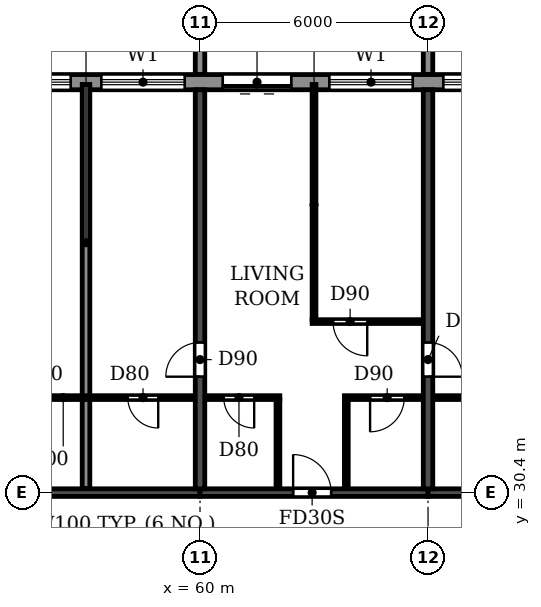
"""IFC4 building model, lengths in metres.
Left out: names, types, materials, properties, quantities, classifications, styles, units other than length and angle.
Written with IfcOpenShell. Run it as: python <this file> out.ifc"""

import sys

from ifc_helpers import new_model, si_unit, direction, frame, frame_2d, origin, place, context, subcontext, project, spatial, polyline, rectangle, outline, extrude, source, transform, mapped, element, fill, save


model = new_model("IFC4")
c1 = context("Model", 3, precision=1e-05, world=origin(), true_north=direction((0.0, 1.0)))
c2 = subcontext(c1, "Body", "Model", "MODEL_VIEW")
j1 = project(units=[si_unit("LENGTHUNIT", "METRE"), si_unit("PLANEANGLEUNIT", "RADIAN")], contexts=[c1])
p1 = place(None, origin())
s1 = spatial("IfcSite", under=j1, at=p1, CompositionType="ELEMENT")
p2 = place(p1, origin())
s2 = spatial("IfcBuilding", under=s1, at=p2, CompositionType="ELEMENT")
p3 = place(p2, frame((0.0, 0.0, 201.6)))
s3 = spatial("IfcBuildingStorey", under=s2, at=p3, CompositionType="ELEMENT", Elevation=201.6)
p4 = place(p3, frame((60.0, 30.5, 0.0), z_axis=(0.0, 0.0, 1.0), x_axis=(0.0, 1.0, 0.0)))
e1 = element("IfcWall", 1, at=p4, inside=s3, PredefinedType="SHEAR", context=c2, shape_type="SweptSolid", body=[
    extrude(rectangle(XDim=10.5, YDim=0.25, at=frame_2d((5.25, 0.0))), origin(), (0.0, 0.0, 1.0), 3.08),
])
p5 = place(p4, frame((2.95, 0.0, 0.0)))
e2 = element("IfcOpeningElement", 2, at=p5, cuts=e1, PredefinedType="OPENING", context=c2, shape_type="SweptSolid", body=[
    extrude(rectangle(XDim=0.9, YDim=2.1, at=frame_2d((0.45, 1.05))), frame((0.0, 0.135, 0.0), z_axis=(0.0, -1.0, 0.0), x_axis=(1.0, 0.0, 0.0)), (0.0, 0.0, 1.0), 0.27),
])
p6 = place(p3, frame((66.0, 30.5, 0.0), z_axis=(0.0, 0.0, 1.0), x_axis=(0.0, 1.0, 0.0)))
e3 = element("IfcWall", 3, at=p6, inside=s3, PredefinedType="SHEAR", context=c2, shape_type="SweptSolid", body=[
    extrude(rectangle(XDim=10.5, YDim=0.25, at=frame_2d((5.25, 0.0))), origin(), (0.0, 0.0, 1.0), 3.08),
])
p7 = place(p6, frame((2.95, 0.0, 0.0)))
e4 = element("IfcOpeningElement", 4, at=p7, cuts=e3, PredefinedType="OPENING", context=c2, shape_type="SweptSolid", body=[
    extrude(rectangle(XDim=0.9, YDim=2.1, at=frame_2d((0.45, 1.05))), frame((0.0, 0.135, 0.0), z_axis=(0.0, -1.0, 0.0), x_axis=(1.0, 0.0, 0.0)), (0.0, 0.0, 1.0), 0.27),
])
p8 = place(p3, frame((54.0, 30.4, 0.0), z_axis=(0.0, 0.0, 1.0), x_axis=(1.0, 0.0, 0.0)))
e5 = element("IfcWall", 5, at=p8, inside=s3, PredefinedType="SHEAR", context=c2, shape_type="SweptSolid", body=[
    extrude(rectangle(XDim=6.0, YDim=0.2, at=frame_2d((3.0, 0.0))), origin(), (0.0, 0.0, 1.0), 2.48),
])
p9 = place(p3, frame((60.0, 30.4, 0.0), z_axis=(0.0, 0.0, 1.0), x_axis=(1.0, 0.0, 0.0)))
e6 = element("IfcWall", 6, at=p9, inside=s3, PredefinedType="SHEAR", context=c2, shape_type="SweptSolid", body=[
    extrude(rectangle(XDim=6.0, YDim=0.2, at=frame_2d((3.0, 0.0))), origin(), (0.0, 0.0, 1.0), 2.48),
])
p10 = place(p9, frame((2.45, 0.0, 0.0)))
e7 = element("IfcOpeningElement", 7, at=p10, cuts=e6, PredefinedType="OPENING", context=c2, shape_type="SweptSolid", body=[
    extrude(rectangle(XDim=1.0, YDim=2.1, at=frame_2d((0.5, 1.05))), frame((0.0, 0.11, 0.0), z_axis=(0.0, -1.0, 0.0), x_axis=(1.0, 0.0, 0.0)), (0.0, 0.0, 1.0), 0.22),
])
p11 = place(p3, frame((66.0, 30.4, 0.0), z_axis=(0.0, 0.0, 1.0), x_axis=(1.0, 0.0, 0.0)))
e8 = element("IfcWall", 8, at=p11, inside=s3, PredefinedType="SHEAR", context=c2, shape_type="SweptSolid", body=[
    extrude(rectangle(XDim=6.0, YDim=0.2, at=frame_2d((3.0, 0.0))), origin(), (0.0, 0.0, 1.0), 2.48),
])
p12 = place(p3, frame((79.317, 41.2, 0.0), z_axis=(0.0, 0.0, 1.0), x_axis=(-1.0, 0.0, 0.0)))
e9 = element("IfcWall", 9, at=p12, inside=s3, PredefinedType="STANDARD", context=c2, shape_type="SweptSolid", body=[
    extrude(rectangle(XDim=56.634, YDim=0.4, at=frame_2d((28.317, 0.0))), origin(), (0.0, 0.0, 1.0), 3.08),
])
p13 = place(p12, frame((52.717, 0.0, 0.9)))
e10 = element("IfcOpeningElement", 10, at=p13, cuts=e9, PredefinedType="OPENING", context=c2, shape_type="SweptSolid", body=[
    extrude(rectangle(XDim=2.2, YDim=1.5, at=frame_2d((1.1, 0.75))), frame((0.0, 0.21, 0.0), z_axis=(0.0, -1.0, 0.0), x_axis=(1.0, 0.0, 0.0)), (0.0, 0.0, 1.0), 0.42),
])
p14 = place(p12, frame((49.917, 0.0, 0.0)))
e11 = element("IfcOpeningElement", 11, at=p14, cuts=e9, PredefinedType="OPENING", context=c2, shape_type="SweptSolid", body=[
    extrude(rectangle(XDim=1.8, YDim=2.4, at=frame_2d((0.9, 1.2))), frame((0.0, 0.21, 0.0), z_axis=(0.0, -1.0, 0.0), x_axis=(1.0, 0.0, 0.0)), (0.0, 0.0, 1.0), 0.42),
])
p15 = place(p12, frame((46.717, 0.0, 0.9)))
e12 = element("IfcOpeningElement", 12, at=p15, cuts=e9, PredefinedType="OPENING", context=c2, shape_type="SweptSolid", body=[
    extrude(rectangle(XDim=2.2, YDim=1.5, at=frame_2d((1.1, 0.75))), frame((0.0, 0.21, 0.0), z_axis=(0.0, -1.0, 0.0), x_axis=(1.0, 0.0, 0.0)), (0.0, 0.0, 1.0), 0.42),
])
p16 = place(p12, frame((43.917, 0.0, 0.0)))
e13 = element("IfcOpeningElement", 13, at=p16, cuts=e9, PredefinedType="OPENING", context=c2, shape_type="SweptSolid", body=[
    extrude(rectangle(XDim=1.8, YDim=2.4, at=frame_2d((0.9, 1.2))), frame((0.0, 0.21, 0.0), z_axis=(0.0, -1.0, 0.0), x_axis=(1.0, 0.0, 0.0)), (0.0, 0.0, 1.0), 0.42),
])
p17 = place(p12, frame((40.917, 0.0, 0.0)))
e14 = element("IfcOpeningElement", 14, at=p17, cuts=e9, PredefinedType="OPENING", context=c2, shape_type="SweptSolid", body=[
    extrude(rectangle(XDim=1.8, YDim=2.4, at=frame_2d((0.9, 1.2))), frame((0.0, 0.21, 0.0), z_axis=(0.0, -1.0, 0.0), x_axis=(1.0, 0.0, 0.0)), (0.0, 0.0, 1.0), 0.42),
])
p18 = place(p12, frame((37.717, 0.0, 0.9)))
e15 = element("IfcOpeningElement", 15, at=p18, cuts=e9, PredefinedType="OPENING", context=c2, shape_type="SweptSolid", body=[
    extrude(rectangle(XDim=2.2, YDim=1.5, at=frame_2d((1.1, 0.75))), frame((0.0, 0.21, 0.0), z_axis=(0.0, -1.0, 0.0), x_axis=(1.0, 0.0, 0.0)), (0.0, 0.0, 1.0), 0.42),
])
p19 = place(p12, frame((34.717, 0.0, 0.9)))
e16 = element("IfcOpeningElement", 16, at=p19, cuts=e9, PredefinedType="OPENING", context=c2, shape_type="SweptSolid", body=[
    extrude(rectangle(XDim=2.2, YDim=1.5, at=frame_2d((1.1, 0.75))), frame((0.0, 0.21, 0.0), z_axis=(0.0, -1.0, 0.0), x_axis=(1.0, 0.0, 0.0)), (0.0, 0.0, 1.0), 0.42),
])
p20 = place(p12, frame((31.717, 0.0, 0.9)))
e17 = element("IfcOpeningElement", 17, at=p20, cuts=e9, PredefinedType="OPENING", context=c2, shape_type="SweptSolid", body=[
    extrude(rectangle(XDim=2.2, YDim=1.5, at=frame_2d((1.1, 0.75))), frame((0.0, 0.21, 0.0), z_axis=(0.0, -1.0, 0.0), x_axis=(1.0, 0.0, 0.0)), (0.0, 0.0, 1.0), 0.42),
])
p21 = place(p12, frame((28.717, 0.0, 0.9)))
e18 = element("IfcOpeningElement", 18, at=p21, cuts=e9, PredefinedType="OPENING", context=c2, shape_type="SweptSolid", body=[
    extrude(rectangle(XDim=2.2, YDim=1.5, at=frame_2d((1.1, 0.75))), frame((0.0, 0.21, 0.0), z_axis=(0.0, -1.0, 0.0), x_axis=(1.0, 0.0, 0.0)), (0.0, 0.0, 1.0), 0.42),
])
p22 = place(p12, frame((25.917, 0.0, 0.0)))
e19 = element("IfcOpeningElement", 19, at=p22, cuts=e9, PredefinedType="OPENING", context=c2, shape_type="SweptSolid", body=[
    extrude(rectangle(XDim=1.8, YDim=2.4, at=frame_2d((0.9, 1.2))), frame((0.0, 0.21, 0.0), z_axis=(0.0, -1.0, 0.0), x_axis=(1.0, 0.0, 0.0)), (0.0, 0.0, 1.0), 0.42),
])
p23 = place(p12, frame((22.717, 0.0, 0.9)))
e20 = element("IfcOpeningElement", 20, at=p23, cuts=e9, PredefinedType="OPENING", context=c2, shape_type="SweptSolid", body=[
    extrude(rectangle(XDim=2.2, YDim=1.5, at=frame_2d((1.1, 0.75))), frame((0.0, 0.21, 0.0), z_axis=(0.0, -1.0, 0.0), x_axis=(1.0, 0.0, 0.0)), (0.0, 0.0, 1.0), 0.42),
])
p24 = place(p12, frame((19.717, 0.0, 0.9)))
e21 = element("IfcOpeningElement", 21, at=p24, cuts=e9, PredefinedType="OPENING", context=c2, shape_type="SweptSolid", body=[
    extrude(rectangle(XDim=2.2, YDim=1.5, at=frame_2d((1.1, 0.75))), frame((0.0, 0.21, 0.0), z_axis=(0.0, -1.0, 0.0), x_axis=(1.0, 0.0, 0.0)), (0.0, 0.0, 1.0), 0.42),
])
p25 = place(p12, frame((16.917, 0.0, 0.0)))
e22 = element("IfcOpeningElement", 22, at=p25, cuts=e9, PredefinedType="OPENING", context=c2, shape_type="SweptSolid", body=[
    extrude(rectangle(XDim=1.8, YDim=2.4, at=frame_2d((0.9, 1.2))), frame((0.0, 0.21, 0.0), z_axis=(0.0, -1.0, 0.0), x_axis=(1.0, 0.0, 0.0)), (0.0, 0.0, 1.0), 0.42),
])
p26 = place(p12, frame((13.717, 0.0, 0.9)))
e23 = element("IfcOpeningElement", 23, at=p26, cuts=e9, PredefinedType="OPENING", context=c2, shape_type="SweptSolid", body=[
    extrude(rectangle(XDim=2.2, YDim=1.5, at=frame_2d((1.1, 0.75))), frame((0.0, 0.21, 0.0), z_axis=(0.0, -1.0, 0.0), x_axis=(1.0, 0.0, 0.0)), (0.0, 0.0, 1.0), 0.42),
])
p27 = place(p12, frame((10.717, 0.0, 0.9)))
e24 = element("IfcOpeningElement", 24, at=p27, cuts=e9, PredefinedType="OPENING", context=c2, shape_type="SweptSolid", body=[
    extrude(rectangle(XDim=2.2, YDim=1.5, at=frame_2d((1.1, 0.75))), frame((0.0, 0.21, 0.0), z_axis=(0.0, -1.0, 0.0), x_axis=(1.0, 0.0, 0.0)), (0.0, 0.0, 1.0), 0.42),
])
p28 = place(p12, frame((7.717, 0.0, 0.9)))
e25 = element("IfcOpeningElement", 25, at=p28, cuts=e9, PredefinedType="OPENING", context=c2, shape_type="SweptSolid", body=[
    extrude(rectangle(XDim=2.2, YDim=1.5, at=frame_2d((1.1, 0.75))), frame((0.0, 0.21, 0.0), z_axis=(0.0, -1.0, 0.0), x_axis=(1.0, 0.0, 0.0)), (0.0, 0.0, 1.0), 0.42),
])
p29 = place(p12, frame((4.917, 0.0, 0.0)))
e26 = element("IfcOpeningElement", 26, at=p29, cuts=e9, PredefinedType="OPENING", context=c2, shape_type="SweptSolid", body=[
    extrude(rectangle(XDim=1.8, YDim=2.4, at=frame_2d((0.9, 1.2))), frame((0.0, 0.21, 0.0), z_axis=(0.0, -1.0, 0.0), x_axis=(1.0, 0.0, 0.0)), (0.0, 0.0, 1.0), 0.42),
])
p30 = place(p12, frame((1.717, 0.0, 0.9)))
e27 = element("IfcOpeningElement", 27, at=p30, cuts=e9, PredefinedType="OPENING", context=c2, shape_type="SweptSolid", body=[
    extrude(rectangle(XDim=2.2, YDim=1.5, at=frame_2d((1.1, 0.75))), frame((0.0, 0.21, 0.0), z_axis=(0.0, -1.0, 0.0), x_axis=(1.0, 0.0, 0.0)), (0.0, 0.0, 1.0), 0.42),
])
m1 = source(origin(), c2, "Body", "SweptSolid", [
    extrude(outline(polyline([(0.0, 0.0), (0.25, 0.0), (0.25, 3.1), (0.0, 3.1), (0.0, 0.0)])), origin(), (0.0, 0.0, 1.0), 3.1),
])
for number, where in (
    (28, (59.875, 41.4, 0.0)),
    (29, (65.875, 41.4, 0.0)),
):
    element("IfcWall", number, at=place(p3, frame(where)), inside=s3, PredefinedType="STANDARD", context=c2, shape_type="MappedRepresentation", body=[
        mapped(m1, transform((0.0, 0.0, 0.0))),
    ])
p31 = place(p3, frame((57.0, 30.51, 0.0), z_axis=(0.0, 0.0, 1.0), x_axis=(0.0, 1.0, 0.0)))
e30 = element("IfcWall", 30, at=p31, inside=s3, PredefinedType="PARTITIONING", context=c2, shape_type="SweptSolid", body=[
    extrude(rectangle(XDim=10.63, YDim=0.2, at=frame_2d((5.315, 0.0))), origin(), (0.0, 0.0, 1.0), 3.08),
])
p32 = place(p3, frame((54.135, 32.9, 0.0), z_axis=(0.0, 0.0, 1.0), x_axis=(1.0, 0.0, 0.0)))
e31 = element("IfcWall", 31, at=p32, inside=s3, PredefinedType="PARTITIONING", context=c2, shape_type="SweptSolid", body=[
    extrude(rectangle(XDim=5.73, YDim=0.1, at=frame_2d((2.865, 0.0))), origin(), (0.0, 0.0, 1.0), 3.08),
])
p33 = place(p32, frame((0.965, 0.0, 0.0)))
e32 = element("IfcOpeningElement", 32, at=p33, cuts=e31, PredefinedType="OPENING", context=c2, shape_type="SweptSolid", body=[
    extrude(rectangle(XDim=0.8, YDim=2.1, at=frame_2d((0.4, 1.05))), frame((0.0, 0.06, 0.0), z_axis=(0.0, -1.0, 0.0), x_axis=(1.0, 0.0, 0.0)), (0.0, 0.0, 1.0), 0.12),
])
p34 = place(p32, frame((3.965, 0.0, 0.0)))
e33 = element("IfcOpeningElement", 33, at=p34, cuts=e31, PredefinedType="OPENING", context=c2, shape_type="SweptSolid", body=[
    extrude(rectangle(XDim=0.8, YDim=2.1, at=frame_2d((0.4, 1.05))), frame((0.0, 0.06, 0.0), z_axis=(0.0, -1.0, 0.0), x_axis=(1.0, 0.0, 0.0)), (0.0, 0.0, 1.0), 0.12),
])
p35 = place(p3, frame((60.135, 32.9, 0.0), z_axis=(0.0, 0.0, 1.0), x_axis=(1.0, 0.0, 0.0)))
e34 = element("IfcWall", 34, at=p35, inside=s3, PredefinedType="PARTITIONING", context=c2, shape_type="SweptSolid", body=[
    extrude(rectangle(XDim=1.965, YDim=0.1, at=frame_2d((0.982, 0.0))), origin(), (0.0, 0.0, 1.0), 3.08),
])
p36 = place(p35, frame((0.49, 0.0, 0.0)))
e35 = element("IfcOpeningElement", 35, at=p36, cuts=e34, PredefinedType="OPENING", context=c2, shape_type="SweptSolid", body=[
    extrude(rectangle(XDim=0.8, YDim=2.1, at=frame_2d((0.4, 1.05))), frame((0.0, 0.06, 0.0), z_axis=(0.0, -1.0, 0.0), x_axis=(1.0, 0.0, 0.0)), (0.0, 0.0, 1.0), 0.12),
])
p37 = place(p3, frame((63.8, 32.9, 0.0), z_axis=(0.0, 0.0, 1.0), x_axis=(1.0, 0.0, 0.0)))
e36 = element("IfcWall", 36, at=p37, inside=s3, PredefinedType="PARTITIONING", context=c2, shape_type="SweptSolid", body=[
    extrude(rectangle(XDim=2.065, YDim=0.1, at=frame_2d((1.032, 0.0))), origin(), (0.0, 0.0, 1.0), 3.08),
])
p38 = place(p37, frame((0.675, 0.0, 0.0)))
e37 = element("IfcOpeningElement", 37, at=p38, cuts=e36, PredefinedType="OPENING", context=c2, shape_type="SweptSolid", body=[
    extrude(rectangle(XDim=0.9, YDim=2.1, at=frame_2d((0.45, 1.05))), frame((0.0, 0.06, 0.0), z_axis=(0.0, -1.0, 0.0), x_axis=(1.0, 0.0, 0.0)), (0.0, 0.0, 1.0), 0.12),
])
p39 = place(p3, frame((66.135, 32.9, 0.0), z_axis=(0.0, 0.0, 1.0), x_axis=(1.0, 0.0, 0.0)))
e38 = element("IfcWall", 38, at=p39, inside=s3, PredefinedType="PARTITIONING", context=c2, shape_type="SweptSolid", body=[
    extrude(rectangle(XDim=2.765, YDim=0.1, at=frame_2d((1.382, 0.0))), origin(), (0.0, 0.0, 1.0), 3.08),
])
p40 = place(p39, frame((0.965, 0.0, 0.0)))
e39 = element("IfcOpeningElement", 39, at=p40, cuts=e38, PredefinedType="OPENING", context=c2, shape_type="SweptSolid", body=[
    extrude(rectangle(XDim=0.8, YDim=2.1, at=frame_2d((0.4, 1.05))), frame((0.0, 0.06, 0.0), z_axis=(0.0, -1.0, 0.0), x_axis=(1.0, 0.0, 0.0)), (0.0, 0.0, 1.0), 0.12),
])
p41 = place(p3, frame((62.95, 34.9, 0.0), z_axis=(0.0, 0.0, 1.0), x_axis=(1.0, 0.0, 0.0)))
e40 = element("IfcWall", 40, at=p41, inside=s3, PredefinedType="PARTITIONING", context=c2, shape_type="SweptSolid", body=[
    extrude(rectangle(XDim=2.915, YDim=0.1, at=frame_2d((1.458, 0.0))), origin(), (0.0, 0.0, 1.0), 3.08),
])
p42 = place(p41, frame((0.55, 0.0, 0.0)))
e41 = element("IfcOpeningElement", 41, at=p42, cuts=e40, PredefinedType="OPENING", context=c2, shape_type="SweptSolid", body=[
    extrude(rectangle(XDim=0.9, YDim=2.1, at=frame_2d((0.45, 1.05))), frame((0.0, 0.06, 0.0), z_axis=(0.0, -1.0, 0.0), x_axis=(1.0, 0.0, 0.0)), (0.0, 0.0, 1.0), 0.12),
])
p43 = place(p3, frame((62.05, 30.51, 0.0), z_axis=(0.0, 0.0, 1.0), x_axis=(0.0, 1.0, 0.0)))
e42 = element("IfcWall", 42, at=p43, inside=s3, PredefinedType="PARTITIONING", context=c2, shape_type="SweptSolid", body=[
    extrude(rectangle(XDim=2.34, YDim=0.1, at=frame_2d((1.17, 0.0))), origin(), (0.0, 0.0, 1.0), 3.08),
])
p44 = place(p3, frame((63.0, 34.95, 0.0), z_axis=(0.0, 0.0, 1.0), x_axis=(0.0, 1.0, 0.0)))
e43 = element("IfcWall", 43, at=p44, inside=s3, PredefinedType="PARTITIONING", context=c2, shape_type="SweptSolid", body=[
    extrude(rectangle(XDim=6.19, YDim=0.1, at=frame_2d((3.095, 0.0))), origin(), (0.0, 0.0, 1.0), 3.08),
])
p45 = place(p3, frame((63.85, 30.51, 0.0), z_axis=(0.0, 0.0, 1.0), x_axis=(0.0, 1.0, 0.0)))
e44 = element("IfcWall", 44, at=p45, inside=s3, PredefinedType="PARTITIONING", context=c2, shape_type="SweptSolid", body=[
    extrude(rectangle(XDim=2.34, YDim=0.1, at=frame_2d((1.17, 0.0))), origin(), (0.0, 0.0, 1.0), 3.08),
])
p46 = place(p23, origin())
e45 = element("IfcWindow", 45, at=p46, inside=s3, PartitioningType="DOUBLE_PANEL_HORIZONTAL", PredefinedType="WINDOW", context=c2, shape_type="SweptSolid", body=[
    extrude(rectangle(XDim=2.2, YDim=1.5, at=frame_2d((1.1, 0.75))), frame((0.0, 0.03, 0.0), z_axis=(0.0, -1.0, 0.0), x_axis=(1.0, 0.0, 0.0)), (0.0, 0.0, 1.0), 0.06),
])
fill(e20, e45)
p47 = place(p24, origin())
e46 = element("IfcWindow", 46, at=p47, inside=s3, PartitioningType="DOUBLE_PANEL_HORIZONTAL", PredefinedType="WINDOW", context=c2, shape_type="SweptSolid", body=[
    extrude(rectangle(XDim=2.2, YDim=1.5, at=frame_2d((1.1, 0.75))), frame((0.0, 0.03, 0.0), z_axis=(0.0, -1.0, 0.0), x_axis=(1.0, 0.0, 0.0)), (0.0, 0.0, 1.0), 0.06),
])
fill(e21, e46)
p48 = place(p25, origin())
e47 = element("IfcDoor", 47, at=p48, inside=s3, OperationType="DOUBLE_DOOR_SLIDING", PredefinedType="DOOR", context=c2, shape_type="SweptSolid", body=[
    extrude(rectangle(XDim=1.8, YDim=2.4, at=frame_2d((0.9, 1.2))), frame((0.0, 0.025, 0.0), z_axis=(0.0, -1.0, 0.0), x_axis=(1.0, 0.0, 0.0)), (0.0, 0.0, 1.0), 0.05),
])
fill(e22, e47)
p49 = place(p26, origin())
e48 = element("IfcWindow", 48, at=p49, inside=s3, PartitioningType="DOUBLE_PANEL_HORIZONTAL", PredefinedType="WINDOW", context=c2, shape_type="SweptSolid", body=[
    extrude(rectangle(XDim=2.2, YDim=1.5, at=frame_2d((1.1, 0.75))), frame((0.0, 0.03, 0.0), z_axis=(0.0, -1.0, 0.0), x_axis=(1.0, 0.0, 0.0)), (0.0, 0.0, 1.0), 0.06),
])
fill(e23, e48)
p50 = place(p27, origin())
e49 = element("IfcWindow", 49, at=p50, inside=s3, PartitioningType="DOUBLE_PANEL_HORIZONTAL", PredefinedType="WINDOW", context=c2, shape_type="SweptSolid", body=[
    extrude(rectangle(XDim=2.2, YDim=1.5, at=frame_2d((1.1, 0.75))), frame((0.0, 0.03, 0.0), z_axis=(0.0, -1.0, 0.0), x_axis=(1.0, 0.0, 0.0)), (0.0, 0.0, 1.0), 0.06),
])
fill(e24, e49)
p51 = place(p34, frame((0.8, 0.0, 0.0), z_axis=(0.0, 0.0, 1.0), x_axis=(-1.0, 0.0, 0.0)))
e50 = element("IfcDoor", 50, at=p51, inside=s3, OperationType="SINGLE_SWING_LEFT", PredefinedType="DOOR", context=c2, shape_type="SweptSolid", body=[
    extrude(rectangle(XDim=0.8, YDim=2.1, at=frame_2d((0.4, 1.05))), frame((0.0, 0.025, 0.0), z_axis=(0.0, -1.0, 0.0), x_axis=(1.0, 0.0, 0.0)), (0.0, 0.0, 1.0), 0.05),
])
fill(e33, e50)
p52 = place(p5, origin())
e51 = element("IfcDoor", 51, at=p52, inside=s3, OperationType="SINGLE_SWING_LEFT", PredefinedType="DOOR", context=c2, shape_type="SweptSolid", body=[
    extrude(rectangle(XDim=0.9, YDim=2.1, at=frame_2d((0.45, 1.05))), frame((0.0, 0.025, 0.0), z_axis=(0.0, -1.0, 0.0), x_axis=(1.0, 0.0, 0.0)), (0.0, 0.0, 1.0), 0.05),
])
fill(e2, e51)
p53 = place(p36, frame((0.8, 0.0, 0.0), z_axis=(0.0, 0.0, 1.0), x_axis=(-1.0, 0.0, 0.0)))
e52 = element("IfcDoor", 52, at=p53, inside=s3, OperationType="SINGLE_SWING_LEFT", PredefinedType="DOOR", context=c2, shape_type="SweptSolid", body=[
    extrude(rectangle(XDim=0.8, YDim=2.1, at=frame_2d((0.4, 1.05))), frame((0.0, 0.025, 0.0), z_axis=(0.0, -1.0, 0.0), x_axis=(1.0, 0.0, 0.0)), (0.0, 0.0, 1.0), 0.05),
])
fill(e35, e52)
p54 = place(p10, origin())
e53 = element("IfcDoor", 53, at=p54, inside=s3, OperationType="SINGLE_SWING_LEFT", PredefinedType="DOOR", context=c2, shape_type="SweptSolid", body=[
    extrude(rectangle(XDim=1.0, YDim=2.1, at=frame_2d((0.5, 1.05))), frame((0.0, 0.025, 0.0), z_axis=(0.0, -1.0, 0.0), x_axis=(1.0, 0.0, 0.0)), (0.0, 0.0, 1.0), 0.05),
])
fill(e7, e53)
p55 = place(p42, frame((0.9, 0.0, 0.0), z_axis=(0.0, 0.0, 1.0), x_axis=(-1.0, 0.0, 0.0)))
e54 = element("IfcDoor", 54, at=p55, inside=s3, OperationType="SINGLE_SWING_LEFT", PredefinedType="DOOR", context=c2, shape_type="SweptSolid", body=[
    extrude(rectangle(XDim=0.9, YDim=2.1, at=frame_2d((0.45, 1.05))), frame((0.0, 0.025, 0.0), z_axis=(0.0, -1.0, 0.0), x_axis=(1.0, 0.0, 0.0)), (0.0, 0.0, 1.0), 0.05),
])
fill(e41, e54)
p56 = place(p38, frame((0.9, 0.0, 0.0), z_axis=(0.0, 0.0, 1.0), x_axis=(-1.0, 0.0, 0.0)))
e55 = element("IfcDoor", 55, at=p56, inside=s3, OperationType="SINGLE_SWING_RIGHT", PredefinedType="DOOR", context=c2, shape_type="SweptSolid", body=[
    extrude(rectangle(XDim=0.9, YDim=2.1, at=frame_2d((0.45, 1.05))), frame((0.0, 0.025, 0.0), z_axis=(0.0, -1.0, 0.0), x_axis=(1.0, 0.0, 0.0)), (0.0, 0.0, 1.0), 0.05),
])
fill(e37, e55)
p57 = place(p7, frame((0.9, 0.0, 0.0), z_axis=(0.0, 0.0, 1.0), x_axis=(-1.0, 0.0, 0.0)))
e56 = element("IfcDoor", 56, at=p57, inside=s3, OperationType="SINGLE_SWING_RIGHT", PredefinedType="DOOR", context=c2, shape_type="SweptSolid", body=[
    extrude(rectangle(XDim=0.9, YDim=2.1, at=frame_2d((0.45, 1.05))), frame((0.0, 0.025, 0.0), z_axis=(0.0, -1.0, 0.0), x_axis=(1.0, 0.0, 0.0)), (0.0, 0.0, 1.0), 0.05),
])
fill(e4, e56)
save(model, sys.argv[1])
